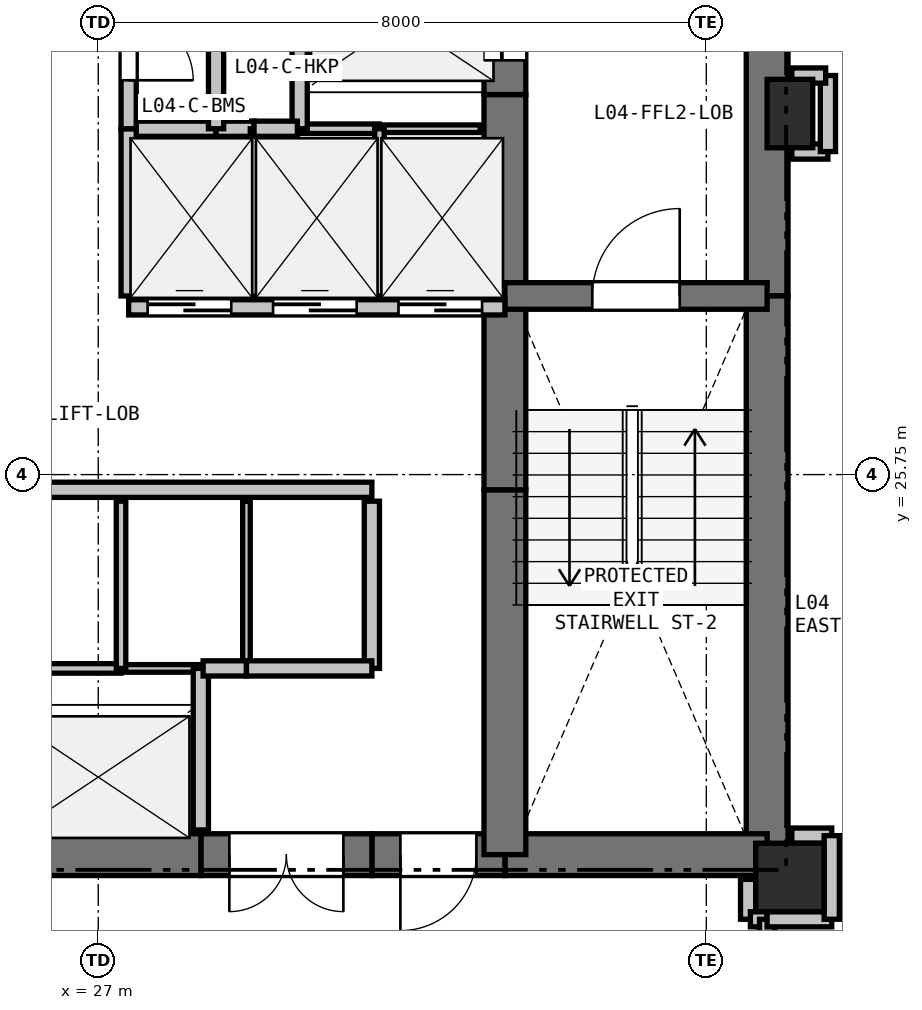
"""IFC4 building model, lengths in metres.
Left out: names, types, materials, properties, quantities, classifications, styles, units other than length and angle.
Written with IfcOpenShell. Run it as: python <this file> out.ifc"""

import sys

from ifc_helpers import new_model, si_unit, direction, frame, frame_2d, origin, origin_2d, place, context, subcontext, project, spatial, rectangle, extrude, element, fill, save


model = new_model("IFC4")
c1 = context("Model", 3, precision=1e-05, world=origin(), true_north=direction((0.0, 1.0)))
c2 = subcontext(c1, "Body", "Model", "MODEL_VIEW")
j1 = project(units=[si_unit("LENGTHUNIT", "METRE"), si_unit("PLANEANGLEUNIT", "RADIAN")], contexts=[c1])
p1 = place(None, origin())
s1 = spatial("IfcSite", under=j1, at=p1, CompositionType="ELEMENT")
p2 = place(p1, origin())
s2 = spatial("IfcBuilding", under=s1, at=p2, CompositionType="ELEMENT")
p3 = place(p2, frame((0.0, 0.0, 19.2)))
s3 = spatial("IfcBuildingStorey", under=s2, at=p3, CompositionType="ELEMENT", Elevation=19.2)
p4 = place(p3, frame((36.1, 20.45, 0.0), z_axis=(0.0, 0.0, 1.0), x_axis=(1.0, 0.0, 0.0)))
e1 = element("IfcColumn", 1, at=p4, inside=s3, PredefinedType="COLUMN", context=c2, shape_type="SweptSolid", body=[
    extrude(rectangle(XDim=0.9, YDim=0.9, at=origin_2d()), origin(), (0.0, 0.0, 1.0), 3.3),
])
p5 = place(p3, frame((36.1, 30.5, 0.0), z_axis=(0.0, 0.0, 1.0), x_axis=(1.0, 0.0, 0.0)))
e2 = element("IfcColumn", 2, at=p5, inside=s3, PredefinedType="PILASTER", context=c2, shape_type="SweptSolid", body=[
    extrude(rectangle(XDim=0.6, YDim=0.9, at=origin_2d()), origin(), (0.0, 0.0, 1.0), 3.3),
])
p6 = place(p3, frame((35.8, 32.75, 0.0), z_axis=(0.0, 0.0, 1.0), x_axis=(0.0, -1.0, 0.0)))
e3 = element("IfcWall", 3, at=p6, inside=s3, PredefinedType="SHEAR", context=c2, shape_type="SweptSolid", body=[
    extrude(rectangle(XDim=4.65, YDim=0.55, at=frame_2d((2.325, 0.0))), origin(), (0.0, 0.0, 1.0), 3.04),
])
p7 = place(p3, frame((35.8, 28.1, 0.0), z_axis=(0.0, 0.0, 1.0), x_axis=(0.0, -1.0, 0.0)))
e4 = element("IfcWall", 4, at=p7, inside=s3, PredefinedType="SHEAR", context=c2, shape_type="SweptSolid", body=[
    extrude(rectangle(XDim=7.35, YDim=0.55, at=frame_2d((3.675, 0.0))), origin(), (0.0, 0.0, 1.0), 3.04),
])
p8 = place(p3, frame((35.8, 20.75, 0.0), z_axis=(0.0, 0.0, 1.0), x_axis=(-1.0, 0.0, 0.0)))
e5 = element("IfcWall", 5, at=p8, inside=s3, PredefinedType="SHEAR", context=c2, shape_type="SweptSolid", body=[
    extrude(rectangle(XDim=3.45, YDim=0.55, at=frame_2d((1.725, 0.0))), origin(), (0.0, 0.0, 1.0), 3.04),
])
p9 = place(p3, frame((32.35, 20.75, 0.0), z_axis=(0.0, 0.0, 1.0), x_axis=(-1.0, 0.0, 0.0)))
e6 = element("IfcWall", 6, at=p9, inside=s3, PredefinedType="SHEAR", context=c2, shape_type="SweptSolid", body=[
    extrude(rectangle(XDim=1.75, YDim=0.55, at=frame_2d((0.875, 0.0))), origin(), (0.0, 0.0, 1.0), 3.04),
])
p10 = place(p9, frame((0.375, 0.0, 0.0)))
e7 = element("IfcOpeningElement", 7, at=p10, cuts=e6, PredefinedType="OPENING", context=c2, shape_type="SweptSolid", body=[
    extrude(rectangle(XDim=1.0, YDim=2.15, at=frame_2d((0.5, 1.075))), frame((0.0, 0.285, 0.0), z_axis=(0.0, -1.0, 0.0), x_axis=(1.0, 0.0, 0.0)), (0.0, 0.0, 1.0), 0.57),
])
p11 = place(p3, frame((30.6, 20.75, 0.0), z_axis=(0.0, 0.0, 1.0), x_axis=(-1.0, 0.0, 0.0)))
e8 = element("IfcWall", 8, at=p11, inside=s3, PredefinedType="SHEAR", context=c2, shape_type="SweptSolid", body=[
    extrude(rectangle(XDim=2.25, YDim=0.55, at=frame_2d((1.125, 0.0))), origin(), (0.0, 0.0, 1.0), 3.04),
])
p12 = place(p11, frame((0.375, 0.0, 0.0)))
e9 = element("IfcOpeningElement", 9, at=p12, cuts=e8, PredefinedType="OPENING", context=c2, shape_type="SweptSolid", body=[
    extrude(rectangle(XDim=1.5, YDim=2.2, at=frame_2d((0.75, 1.1))), frame((0.0, 0.285, 0.0), z_axis=(0.0, -1.0, 0.0), x_axis=(1.0, 0.0, 0.0)), (0.0, 0.0, 1.0), 0.57),
])
p13 = place(p3, frame((28.35, 20.75, 0.0), z_axis=(0.0, 0.0, 1.0), x_axis=(-1.0, 0.0, 0.0)))
e10 = element("IfcWall", 10, at=p13, inside=s3, PredefinedType="SHEAR", context=c2, shape_type="SweptSolid", body=[
    extrude(rectangle(XDim=2.7, YDim=0.55, at=frame_2d((1.35, 0.0))), origin(), (0.0, 0.0, 1.0), 3.04),
])
p14 = place(p3, frame((32.35, 20.75, 0.0), z_axis=(0.0, 0.0, 1.0), x_axis=(0.0, 1.0, 0.0)))
e11 = element("IfcWall", 11, at=p14, inside=s3, PredefinedType="SHEAR", context=c2, shape_type="SweptSolid", body=[
    extrude(rectangle(XDim=4.8, YDim=0.55, at=frame_2d((2.4, 0.0))), origin(), (0.0, 0.0, 1.0), 3.04),
])
p15 = place(p3, frame((32.35, 25.55, 0.0), z_axis=(0.0, 0.0, 1.0), x_axis=(0.0, 1.0, 0.0)))
e12 = element("IfcWall", 12, at=p15, inside=s3, PredefinedType="SHEAR", context=c2, shape_type="SweptSolid", body=[
    extrude(rectangle(XDim=2.4, YDim=0.55, at=frame_2d((1.2, 0.0))), origin(), (0.0, 0.0, 1.0), 3.04),
])
p16 = place(p3, frame((32.35, 27.95, 0.0), z_axis=(0.0, 0.0, 1.0), x_axis=(0.0, 1.0, 0.0)))
e13 = element("IfcWall", 13, at=p16, inside=s3, PredefinedType="SHEAR", context=c2, shape_type="SweptSolid", body=[
    extrude(rectangle(XDim=2.8, YDim=0.55, at=frame_2d((1.4, 0.0))), origin(), (0.0, 0.0, 1.0), 3.04),
])
p17 = place(p3, frame((32.35, 30.75, 0.0), z_axis=(0.0, 0.0, 1.0), x_axis=(0.0, 1.0, 0.0)))
e14 = element("IfcWall", 14, at=p17, inside=s3, PredefinedType="SHEAR", context=c2, shape_type="SweptSolid", body=[
    extrude(rectangle(XDim=2.0, YDim=0.55, at=frame_2d((1.0, 0.0))), origin(), (0.0, 0.0, 1.0), 3.04),
])
p18 = place(p17, frame((0.45, 0.0, 0.0)))
e15 = element("IfcOpeningElement", 15, at=p18, cuts=e14, PredefinedType="OPENING", context=c2, shape_type="SweptSolid", body=[
    extrude(rectangle(XDim=1.1, YDim=2.15, at=frame_2d((0.55, 1.075))), frame((0.0, 0.285, 0.0), z_axis=(0.0, -1.0, 0.0), x_axis=(1.0, 0.0, 0.0)), (0.0, 0.0, 1.0), 0.57),
])
p19 = place(p3, frame((32.35, 28.1, 0.0), z_axis=(0.0, 0.0, 1.0), x_axis=(1.0, 0.0, 0.0)))
e16 = element("IfcWall", 16, at=p19, inside=s3, PredefinedType="SHEAR", context=c2, shape_type="SweptSolid", body=[
    extrude(rectangle(XDim=3.45, YDim=0.35, at=frame_2d((1.725, 0.0))), origin(), (0.0, 0.0, 1.0), 3.04),
])
p20 = place(p19, frame((1.15, 0.0, 0.0)))
e17 = element("IfcOpeningElement", 17, at=p20, cuts=e16, PredefinedType="OPENING", context=c2, shape_type="SweptSolid", body=[
    extrude(rectangle(XDim=1.15, YDim=2.15, at=frame_2d((0.575, 1.075))), frame((0.0, 0.185, 0.0), z_axis=(0.0, -1.0, 0.0), x_axis=(1.0, 0.0, 0.0)), (0.0, 0.0, 1.0), 0.37),
])
p21 = place(p3, frame((25.65, 25.55, 0.0), z_axis=(0.0, 0.0, 1.0), x_axis=(1.0, 0.0, 0.0)))
e18 = element("IfcWall", 18, at=p21, inside=s3, PredefinedType="PARTITIONING", context=c2, shape_type="SweptSolid", body=[
    extrude(rectangle(XDim=4.95, YDim=0.2, at=frame_2d((2.475, 0.0))), origin(), (0.0, 0.0, 1.0), 3.04),
])
p22 = place(p3, frame((27.4, 27.95, 0.0), z_axis=(0.0, 0.0, 1.0), x_axis=(1.0, 0.0, 0.0)))
e19 = element("IfcWall", 19, at=p22, inside=s3, PredefinedType="PARTITIONING", context=c2, shape_type="SweptSolid", body=[
    extrude(rectangle(XDim=4.95, YDim=0.2, at=frame_2d((2.475, 0.0))), origin(), (0.0, 0.0, 1.0), 3.04),
])
p23 = place(p22, frame((0.25, 0.0, 0.0)))
e20 = element("IfcOpeningElement", 20, at=p23, cuts=e19, PredefinedType="OPENING", context=c2, shape_type="SweptSolid", body=[
    extrude(rectangle(XDim=1.1, YDim=2.15, at=frame_2d((0.55, 1.075))), frame((0.0, 0.11, 0.0), z_axis=(0.0, -1.0, 0.0), x_axis=(1.0, 0.0, 0.0)), (0.0, 0.0, 1.0), 0.22),
])
p24 = place(p22, frame((1.9, 0.0, 0.0)))
e21 = element("IfcOpeningElement", 21, at=p24, cuts=e19, PredefinedType="OPENING", context=c2, shape_type="SweptSolid", body=[
    extrude(rectangle(XDim=1.1, YDim=2.15, at=frame_2d((0.55, 1.075))), frame((0.0, 0.11, 0.0), z_axis=(0.0, -1.0, 0.0), x_axis=(1.0, 0.0, 0.0)), (0.0, 0.0, 1.0), 0.22),
])
p25 = place(p22, frame((3.55, 0.0, 0.0)))
e22 = element("IfcOpeningElement", 22, at=p25, cuts=e19, PredefinedType="OPENING", context=c2, shape_type="SweptSolid", body=[
    extrude(rectangle(XDim=1.1, YDim=2.15, at=frame_2d((0.55, 1.075))), frame((0.0, 0.11, 0.0), z_axis=(0.0, -1.0, 0.0), x_axis=(1.0, 0.0, 0.0)), (0.0, 0.0, 1.0), 0.22),
])
p26 = place(p3, frame((25.975, 23.2, 0.0), z_axis=(0.0, 0.0, 1.0), x_axis=(1.0, 0.0, 0.0)))
e23 = element("IfcWall", 23, at=p26, inside=s3, PredefinedType="PARTITIONING", context=c2, shape_type="SweptSolid", body=[
    extrude(rectangle(XDim=1.325, YDim=0.125, at=frame_2d((0.663, 0.0))), origin(), (0.0, 0.0, 1.0), 3.04),
])
p27 = place(p3, frame((27.3, 23.2, 0.0), z_axis=(0.0, 0.0, 1.0), x_axis=(1.0, 0.0, 0.0)))
e24 = element("IfcWall", 24, at=p27, inside=s3, PredefinedType="PARTITIONING", context=c2, shape_type="SweptSolid", body=[
    extrude(rectangle(XDim=1.05, YDim=0.1, at=frame_2d((0.525, 0.0))), origin(), (0.0, 0.0, 1.0), 3.04),
])
p28 = place(p3, frame((28.35, 23.2, 0.0), z_axis=(0.0, 0.0, 1.0), x_axis=(0.0, -1.0, 0.0)))
e25 = element("IfcWall", 25, at=p28, inside=s3, PredefinedType="PARTITIONING", context=c2, shape_type="SweptSolid", body=[
    extrude(rectangle(XDim=2.125, YDim=0.2, at=frame_2d((1.062, 0.0))), origin(), (0.0, 0.0, 1.0), 3.04),
])
p29 = place(p3, frame((32.025, 30.3, 0.0), z_axis=(0.0, 0.0, 1.0), x_axis=(-1.0, 0.0, 0.0)))
e26 = element("IfcWall", 26, at=p29, inside=s3, PredefinedType="PARTITIONING", context=c2, shape_type="SweptSolid", body=[
    extrude(rectangle(XDim=1.325, YDim=0.1, at=frame_2d((0.663, 0.0))), origin(), (0.0, 0.0, 1.0), 3.04),
])
p30 = place(p3, frame((30.7, 30.3, 0.0), z_axis=(0.0, 0.0, 1.0), x_axis=(-1.0, 0.0, 0.0)))
e27 = element("IfcWall", 27, at=p30, inside=s3, PredefinedType="PARTITIONING", context=c2, shape_type="SweptSolid", body=[
    extrude(rectangle(XDim=1.05, YDim=0.125, at=frame_2d((0.525, 0.0))), origin(), (0.0, 0.0, 1.0), 3.04),
])
p31 = place(p3, frame((29.65, 30.3, 0.0), z_axis=(0.0, 0.0, 1.0), x_axis=(0.0, 1.0, 0.0)))
e28 = element("IfcWall", 28, at=p31, inside=s3, PredefinedType="PARTITIONING", context=c2, shape_type="SweptSolid", body=[
    extrude(rectangle(XDim=2.125, YDim=0.2, at=frame_2d((1.062, 0.0))), origin(), (0.0, 0.0, 1.0), 3.04),
])
p32 = place(p3, frame((27.3, 25.4, 0.0), z_axis=(0.0, 0.0, 1.0), x_axis=(0.0, -1.0, 0.0)))
e29 = element("IfcWall", 29, at=p32, inside=s3, PredefinedType="PARTITIONING", context=c2, shape_type="SweptSolid", body=[
    extrude(rectangle(XDim=2.2, YDim=0.125, at=frame_2d((1.1, 0.0))), origin(), (0.0, 0.0, 1.0), 3.04),
])
p33 = place(p3, frame((28.95, 25.4, 0.0), z_axis=(0.0, 0.0, 1.0), x_axis=(0.0, -1.0, 0.0)))
e30 = element("IfcWall", 30, at=p33, inside=s3, PredefinedType="PARTITIONING", context=c2, shape_type="SweptSolid", body=[
    extrude(rectangle(XDim=2.2, YDim=0.1, at=frame_2d((1.1, 0.0))), origin(), (0.0, 0.0, 1.0), 3.04),
])
p34 = place(p3, frame((28.95, 23.2, 0.0), z_axis=(0.0, 0.0, 1.0), x_axis=(-1.0, 0.0, 0.0)))
e31 = element("IfcWall", 31, at=p34, inside=s3, PredefinedType="PARTITIONING", context=c2, shape_type="SweptSolid", body=[
    extrude(rectangle(XDim=0.57, YDim=0.2, at=frame_2d((0.285, 0.0))), origin(), (0.0, 0.0, 1.0), 3.04),
])
p35 = place(p3, frame((30.6, 25.4, 0.0), z_axis=(0.0, 0.0, 1.0), x_axis=(0.0, -1.0, 0.0)))
e32 = element("IfcWall", 32, at=p35, inside=s3, PredefinedType="PARTITIONING", context=c2, shape_type="SweptSolid", body=[
    extrude(rectangle(XDim=2.2, YDim=0.2, at=frame_2d((1.1, 0.0))), origin(), (0.0, 0.0, 1.0), 3.04),
])
p36 = place(p3, frame((30.6, 23.2, 0.0), z_axis=(0.0, 0.0, 1.0), x_axis=(-1.0, 0.0, 0.0)))
e33 = element("IfcWall", 33, at=p36, inside=s3, PredefinedType="PARTITIONING", context=c2, shape_type="SweptSolid", body=[
    extrude(rectangle(XDim=1.65, YDim=0.2, at=frame_2d((0.825, 0.0))), origin(), (0.0, 0.0, 1.0), 3.04),
])
p37 = place(p3, frame((27.4, 30.3, 0.0), z_axis=(0.0, 0.0, 1.0), x_axis=(1.0, 0.0, 0.0)))
e34 = element("IfcWall", 34, at=p37, inside=s3, PredefinedType="PARTITIONING", context=c2, shape_type="SweptSolid", body=[
    extrude(rectangle(XDim=1.15, YDim=0.2, at=frame_2d((0.575, 0.0))), origin(), (0.0, 0.0, 1.0), 3.04),
])
p38 = place(p3, frame((28.55, 30.3, 0.0), z_axis=(0.0, 0.0, 1.0), x_axis=(1.0, 0.0, 0.0)))
e35 = element("IfcWall", 35, at=p38, inside=s3, PredefinedType="PARTITIONING", context=c2, shape_type="SweptSolid", body=[
    extrude(rectangle(XDim=0.5, YDim=0.2, at=frame_2d((0.25, 0.0))), origin(), (0.0, 0.0, 1.0), 3.04),
])
p39 = place(p3, frame((29.05, 30.3, 0.0), z_axis=(0.0, 0.0, 1.0), x_axis=(0.0, -1.0, 0.0)))
e36 = element("IfcWall", 36, at=p39, inside=s3, PredefinedType="PARTITIONING", context=c2, shape_type="SweptSolid", body=[
    extrude(rectangle(XDim=2.2, YDim=0.1, at=frame_2d((1.1, 0.0))), origin(), (0.0, 0.0, 1.0), 3.04),
])
p40 = place(p3, frame((27.4, 28.1, 0.0), z_axis=(0.0, 0.0, 1.0), x_axis=(0.0, 1.0, 0.0)))
e37 = element("IfcWall", 37, at=p40, inside=s3, PredefinedType="PARTITIONING", context=c2, shape_type="SweptSolid", body=[
    extrude(rectangle(XDim=2.2, YDim=0.2, at=frame_2d((1.1, 0.0))), origin(), (0.0, 0.0, 1.0), 3.04),
])
p41 = place(p3, frame((29.05, 30.3, 0.0), z_axis=(0.0, 0.0, 1.0), x_axis=(1.0, 0.0, 0.0)))
e38 = element("IfcWall", 38, at=p41, inside=s3, PredefinedType="PARTITIONING", context=c2, shape_type="SweptSolid", body=[
    extrude(rectangle(XDim=0.57, YDim=0.2, at=frame_2d((0.285, 0.0))), origin(), (0.0, 0.0, 1.0), 3.04),
])
p42 = place(p3, frame((30.7, 30.3, 0.0), z_axis=(0.0, 0.0, 1.0), x_axis=(0.0, -1.0, 0.0)))
e39 = element("IfcWall", 39, at=p42, inside=s3, PredefinedType="PARTITIONING", context=c2, shape_type="SweptSolid", body=[
    extrude(rectangle(XDim=2.2, YDim=0.125, at=frame_2d((1.1, 0.0))), origin(), (0.0, 0.0, 1.0), 3.04),
])
p43 = place(p3, frame((27.4, 32.425, 0.0), z_axis=(0.0, 0.0, 1.0), x_axis=(0.0, -1.0, 0.0)))
e40 = element("IfcWall", 40, at=p43, inside=s3, PredefinedType="PARTITIONING", context=c2, shape_type="SweptSolid", body=[
    extrude(rectangle(XDim=2.125, YDim=0.2, at=frame_2d((1.062, 0.0))), origin(), (0.0, 0.0, 1.0), 3.04),
])
p44 = place(p43, frame((0.637, 0.0, 0.0)))
e41 = element("IfcOpeningElement", 41, at=p44, cuts=e40, PredefinedType="OPENING", context=c2, shape_type="SweptSolid", body=[
    extrude(rectangle(XDim=0.85, YDim=2.1, at=frame_2d((0.425, 1.05))), frame((0.0, 0.11, 0.0), z_axis=(0.0, -1.0, 0.0), x_axis=(1.0, 0.0, 0.0)), (0.0, 0.0, 1.0), 0.22),
])
p45 = place(p3, frame((35.55, 20.425, 0.0), z_axis=(0.0, 0.0, 1.0), x_axis=(0.0, -1.0, 0.0)))
e42 = element("IfcWall", 42, at=p45, inside=s3, PredefinedType="PARTITIONING", context=c2, shape_type="SweptSolid", body=[
    extrude(rectangle(XDim=0.525, YDim=0.2, at=frame_2d((0.263, 0.0))), origin(), (0.0, 0.0, 1.0), 2.488),
])
p46 = place(p3, frame((35.58, 19.9, 0.0), z_axis=(0.0, 0.0, 1.0), x_axis=(1.0, 0.0, 0.0)))
e43 = element("IfcWall", 43, at=p46, inside=s3, PredefinedType="PARTITIONING", context=c2, shape_type="SweptSolid", body=[
    extrude(rectangle(XDim=0.22, YDim=0.2, at=frame_2d((0.11, 0.0))), origin(), (0.0, 0.0, 1.0), 3.04),
])
p47 = place(p3, frame((35.8, 19.9, 0.0), z_axis=(0.0, 0.0, 1.0), x_axis=(0.0, -1.0, 0.0)))
e44 = element("IfcWall", 44, at=p47, inside=s3, PredefinedType="PARTITIONING", context=c2, shape_type="SweptSolid", body=[
    extrude(rectangle(XDim=1.75, YDim=0.2, at=frame_2d((0.875, 0.0))), origin(), (0.0, 0.0, 1.0), 3.04),
])
p48 = place(p47, frame((0.375, 0.0, 0.0)))
e45 = element("IfcOpeningElement", 45, at=p48, cuts=e44, PredefinedType="OPENING", context=c2, shape_type="SweptSolid", body=[
    extrude(rectangle(XDim=1.0, YDim=2.15, at=frame_2d((0.5, 1.075))), frame((0.0, 0.11, 0.0), z_axis=(0.0, -1.0, 0.0), x_axis=(1.0, 0.0, 0.0)), (0.0, 0.0, 1.0), 0.22),
])
p49 = place(p3, frame((36.65, 21.0, 0.0), z_axis=(0.0, 0.0, 1.0), x_axis=(-1.0, 0.0, 0.0)))
e46 = element("IfcWall", 46, at=p49, inside=s3, PredefinedType="PARTITIONING", context=c2, shape_type="SweptSolid", body=[
    extrude(rectangle(XDim=0.525, YDim=0.2, at=frame_2d((0.262, 0.0))), origin(), (0.0, 0.0, 1.0), 2.488),
])
p50 = place(p3, frame((36.125, 30.0, 0.0), z_axis=(0.0, 0.0, 1.0), x_axis=(1.0, 0.0, 0.0)))
e47 = element("IfcWall", 47, at=p50, inside=s3, PredefinedType="PARTITIONING", context=c2, shape_type="SweptSolid", body=[
    extrude(rectangle(XDim=0.475, YDim=0.2, at=frame_2d((0.238, 0.0))), origin(), (0.0, 0.0, 1.0), 2.488),
])
p51 = place(p3, frame((36.6, 30.0, 0.0), z_axis=(0.0, 0.0, 1.0), x_axis=(0.0, 1.0, 0.0)))
e48 = element("IfcWall", 48, at=p51, inside=s3, PredefinedType="PARTITIONING", context=c2, shape_type="SweptSolid", body=[
    extrude(rectangle(XDim=1.0, YDim=0.2, at=frame_2d((0.5, 0.0))), origin(), (0.0, 0.0, 1.0), 3.04),
])
p52 = place(p3, frame((36.57, 31.0, 0.0), z_axis=(0.0, 0.0, 1.0), x_axis=(-1.0, 0.0, 0.0)))
e49 = element("IfcWall", 49, at=p52, inside=s3, PredefinedType="PARTITIONING", context=c2, shape_type="SweptSolid", body=[
    extrude(rectangle(XDim=0.445, YDim=0.2, at=frame_2d((0.223, 0.0))), origin(), (0.0, 0.0, 1.0), 2.488),
])
p53 = place(p3, frame((35.8, 19.9, 0.0), z_axis=(0.0, 0.0, 1.0), x_axis=(1.0, 0.0, 0.0)))
e50 = element("IfcWall", 50, at=p53, inside=s3, PredefinedType="PARTITIONING", context=c2, shape_type="SweptSolid", body=[
    extrude(rectangle(XDim=0.85, YDim=0.2, at=frame_2d((0.425, 0.0))), origin(), (0.0, 0.0, 1.0), 2.338),
])
p54 = place(p3, frame((36.65, 19.9, 0.0), z_axis=(0.0, 0.0, 1.0), x_axis=(0.0, 1.0, 0.0)))
e51 = element("IfcWall", 51, at=p54, inside=s3, PredefinedType="PARTITIONING", context=c2, shape_type="SweptSolid", body=[
    extrude(rectangle(XDim=1.1, YDim=0.2, at=frame_2d((0.55, 0.0))), origin(), (0.0, 0.0, 1.0), 3.04),
])
p55 = place(p3, frame((28.55, 32.425, 0.0), z_axis=(0.0, 0.0, 1.0), x_axis=(0.0, -1.0, 0.0)))
e52 = element("IfcWall", 52, at=p55, inside=s3, PredefinedType="PARTITIONING", context=c2, shape_type="SweptSolid", body=[
    extrude(rectangle(XDim=2.125, YDim=0.2, at=frame_2d((1.062, 0.0))), origin(), (0.0, 0.0, 1.0), 3.04),
])
p56 = place(p23, origin())
e53 = element("IfcDoor", 53, at=p56, inside=s3, OperationType="SLIDING_TO_LEFT", PredefinedType="DOOR", context=c2, shape_type="SweptSolid", body=[
    extrude(rectangle(XDim=1.1, YDim=2.15, at=frame_2d((0.55, 1.075))), frame((0.0, 0.025, 0.0), z_axis=(0.0, -1.0, 0.0), x_axis=(1.0, 0.0, 0.0)), (0.0, 0.0, 1.0), 0.05),
])
fill(e20, e53)
p57 = place(p24, origin())
e54 = element("IfcDoor", 54, at=p57, inside=s3, OperationType="SLIDING_TO_LEFT", PredefinedType="DOOR", context=c2, shape_type="SweptSolid", body=[
    extrude(rectangle(XDim=1.1, YDim=2.15, at=frame_2d((0.55, 1.075))), frame((0.0, 0.025, 0.0), z_axis=(0.0, -1.0, 0.0), x_axis=(1.0, 0.0, 0.0)), (0.0, 0.0, 1.0), 0.05),
])
fill(e21, e54)
p58 = place(p25, origin())
e55 = element("IfcDoor", 55, at=p58, inside=s3, OperationType="SLIDING_TO_LEFT", PredefinedType="DOOR", context=c2, shape_type="SweptSolid", body=[
    extrude(rectangle(XDim=1.1, YDim=2.15, at=frame_2d((0.55, 1.075))), frame((0.0, 0.025, 0.0), z_axis=(0.0, -1.0, 0.0), x_axis=(1.0, 0.0, 0.0)), (0.0, 0.0, 1.0), 0.05),
])
fill(e22, e55)
p59 = place(p10, origin())
e56 = element("IfcDoor", 56, at=p59, inside=s3, OperationType="SINGLE_SWING_RIGHT", PredefinedType="DOOR", context=c2, shape_type="SweptSolid", body=[
    extrude(rectangle(XDim=1.0, YDim=2.15, at=frame_2d((0.5, 1.075))), frame((0.0, 0.025, 0.0), z_axis=(0.0, -1.0, 0.0), x_axis=(1.0, 0.0, 0.0)), (0.0, 0.0, 1.0), 0.05),
])
fill(e7, e56)
p60 = place(p18, origin())
e57 = element("IfcDoor", 57, at=p60, inside=s3, OperationType="SLIDING_TO_LEFT", PredefinedType="DOOR", context=c2, shape_type="SweptSolid", body=[
    extrude(rectangle(XDim=1.1, YDim=2.15, at=frame_2d((0.55, 1.075))), frame((0.0, 0.025, 0.0), z_axis=(0.0, -1.0, 0.0), x_axis=(1.0, 0.0, 0.0)), (0.0, 0.0, 1.0), 0.05),
])
fill(e15, e57)
p61 = place(p20, origin())
e58 = element("IfcDoor", 58, at=p61, inside=s3, OperationType="SINGLE_SWING_RIGHT", PredefinedType="DOOR", context=c2, shape_type="SweptSolid", body=[
    extrude(rectangle(XDim=1.15, YDim=2.15, at=frame_2d((0.575, 1.075))), frame((0.0, 0.025, 0.0), z_axis=(0.0, -1.0, 0.0), x_axis=(1.0, 0.0, 0.0)), (0.0, 0.0, 1.0), 0.05),
])
fill(e17, e58)
p62 = place(p12, origin())
e59 = element("IfcDoor", 59, at=p62, inside=s3, OperationType="DOUBLE_DOOR_SINGLE_SWING", PredefinedType="DOOR", context=c2, shape_type="SweptSolid", body=[
    extrude(rectangle(XDim=1.5, YDim=2.2, at=frame_2d((0.75, 1.1))), frame((0.0, 0.025, 0.0), z_axis=(0.0, -1.0, 0.0), x_axis=(1.0, 0.0, 0.0)), (0.0, 0.0, 1.0), 0.05),
])
fill(e9, e59)
p63 = place(p44, origin())
e60 = element("IfcDoor", 60, at=p63, inside=s3, OperationType="SINGLE_SWING_RIGHT", PredefinedType="DOOR", context=c2, shape_type="SweptSolid", body=[
    extrude(rectangle(XDim=0.85, YDim=2.1, at=frame_2d((0.425, 1.05))), frame((0.0, 0.025, 0.0), z_axis=(0.0, -1.0, 0.0), x_axis=(1.0, 0.0, 0.0)), (0.0, 0.0, 1.0), 0.05),
])
fill(e41, e60)
save(model, sys.argv[1])
